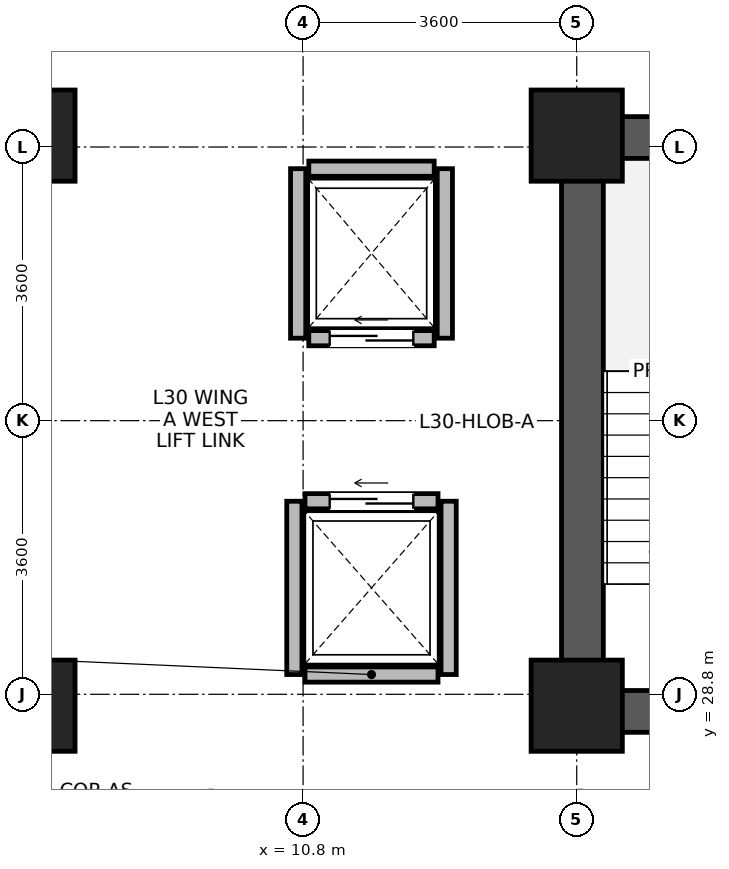
"""IFC4 building model, lengths in metres.
Left out: names, types, materials, properties, quantities, classifications, styles, units other than length and angle.
Written with IfcOpenShell. Run it as: python <this file> out.ifc"""

import sys

from ifc_helpers import new_model, si_unit, direction, frame, frame_2d, origin, origin_2d, place, context, subcontext, project, spatial, rectangle, extrude, source, transform, mapped, element, fill, save


model = new_model("IFC4")
c1 = context("Model", 3, precision=1e-05, world=origin(), true_north=direction((0.0, 1.0)))
c2 = subcontext(c1, "Body", "Model", "MODEL_VIEW")
j1 = project(units=[si_unit("LENGTHUNIT", "METRE"), si_unit("PLANEANGLEUNIT", "RADIAN")], contexts=[c1])
p1 = place(None, origin())
s1 = spatial("IfcSite", under=j1, at=p1, CompositionType="ELEMENT")
p2 = place(p1, origin())
s2 = spatial("IfcBuilding", under=s1, at=p2, CompositionType="ELEMENT")
p3 = place(p2, frame((0.0, 0.0, 119.3)))
s3 = spatial("IfcBuildingStorey", under=s2, at=p3, CompositionType="ELEMENT", Elevation=119.3)
p4 = place(p3, frame((14.475, 28.3, 0.0), z_axis=(0.0, 0.0, 1.0), x_axis=(0.0, 1.0, 0.0)))
e1 = element("IfcWall", 1, at=p4, inside=s3, PredefinedType="SHEAR", context=c2, shape_type="SweptSolid", body=[
    extrude(rectangle(XDim=8.1, YDim=0.55, at=frame_2d((4.05, 0.0))), origin(), (0.0, 0.0, 1.0), 3.45),
])
for number, where, z_axis, x_axis in (
    (2, (14.75, 28.575, 0.0), (0.0, 0.0, 1.0), (1.0, 0.0, 0.0)),
    (3, (14.75, 36.125, 0.0), (0.0, 0.0, 1.0), (1.0, 0.0, 0.0)),
):
    element("IfcWall", number, at=place(p3, frame(where, z_axis=z_axis, x_axis=x_axis)), inside=s3, PredefinedType="SHEAR", context=c2, shape_type="SweptSolid", body=[
        extrude(rectangle(XDim=3.2, YDim=0.55, at=frame_2d((1.6, 0.0))), origin(), (0.0, 0.0, 1.0), 3.45),
    ])
m1 = source(origin(), c2, "Body", "SweptSolid", [
    extrude(rectangle(XDim=1.2, YDim=1.2, at=origin_2d()), origin(), (0.0, 0.0, 1.0), 3.7),
])
for number, where, z_axis, x_axis in (
    (4, (7.2, 28.65, 0.0), (0.0, 0.0, 1.0), (1.0, 0.0, 0.0)),
    (5, (7.2, 36.15, 0.0), (0.0, 0.0, 1.0), (1.0, 0.0, 0.0)),
    (6, (14.4, 28.65, 0.0), (0.0, 0.0, 1.0), (1.0, 0.0, 0.0)),
    (7, (14.4, 36.15, 0.0), (0.0, 0.0, 1.0), (1.0, 0.0, 0.0)),
):
    element("IfcColumn", number, at=place(p3, frame(where, z_axis=z_axis, x_axis=x_axis)), inside=s3, PredefinedType="COLUMN", context=c2, shape_type="MappedRepresentation", body=[
        mapped(m1, transform((0.0, 0.0, 0.0), x_axis=(1.0, 0.0, 0.0), y_axis=(0.0, 1.0, 0.0), z_axis=(0.0, 0.0, 1.0), scale=1.0)),
    ])
p5 = place(p3, frame((10.825, 29.06, 0.0), z_axis=(0.0, 0.0, 1.0), x_axis=(1.0, 0.0, 0.0)))
e8 = element("IfcWall", 8, at=p5, inside=s3, PredefinedType="PARTITIONING", context=c2, shape_type="SweptSolid", body=[
    extrude(rectangle(XDim=1.75, YDim=0.2, at=frame_2d((0.875, 0.0))), origin(), (0.0, 0.0, 1.0), 3.43),
])
p6 = place(p3, frame((10.825, 31.34, 0.0), z_axis=(0.0, 0.0, 1.0), x_axis=(1.0, 0.0, 0.0)))
e9 = element("IfcWall", 9, at=p6, inside=s3, PredefinedType="PARTITIONING", context=c2, shape_type="SweptSolid", body=[
    extrude(rectangle(XDim=1.75, YDim=0.2, at=frame_2d((0.875, 0.0))), origin(), (0.0, 0.0, 1.0), 3.43),
])
p7 = place(p6, frame((0.325, 0.0, 0.0)))
e10 = element("IfcOpeningElement", 10, at=p7, cuts=e9, PredefinedType="OPENING", context=c2, shape_type="SweptSolid", body=[
    extrude(rectangle(XDim=1.1, YDim=2.12, at=frame_2d((0.55, 1.06))), frame((0.0, 0.11, 0.0), z_axis=(0.0, -1.0, 0.0), x_axis=(1.0, 0.0, 0.0)), (0.0, 0.0, 1.0), 0.22),
])
for number, where, z_axis, x_axis in (
    (11, (10.685, 29.06, 0.0), (0.0, 0.0, 1.0), (0.0, 1.0, 0.0)),
    (12, (12.715, 29.06, 0.0), (0.0, 0.0, 1.0), (0.0, 1.0, 0.0)),
):
    element("IfcWall", number, at=place(p3, frame(where, z_axis=z_axis, x_axis=x_axis)), inside=s3, PredefinedType="PARTITIONING", context=c2, shape_type="SweptSolid", body=[
        extrude(rectangle(XDim=2.28, YDim=0.2, at=frame_2d((1.14, 0.0))), origin(), (0.0, 0.0, 1.0), 3.43),
    ])
p8 = place(p3, frame((10.875, 33.485, 0.0), z_axis=(0.0, 0.0, 1.0), x_axis=(1.0, 0.0, 0.0)))
e13 = element("IfcWall", 13, at=p8, inside=s3, PredefinedType="PARTITIONING", context=c2, shape_type="SweptSolid", body=[
    extrude(rectangle(XDim=1.65, YDim=0.2, at=frame_2d((0.825, 0.0))), origin(), (0.0, 0.0, 1.0), 3.43),
])
p9 = place(p8, frame((0.275, 0.0, 0.0)))
e14 = element("IfcOpeningElement", 14, at=p9, cuts=e13, PredefinedType="OPENING", context=c2, shape_type="SweptSolid", body=[
    extrude(rectangle(XDim=1.1, YDim=2.12, at=frame_2d((0.55, 1.06))), frame((0.0, 0.11, 0.0), z_axis=(0.0, -1.0, 0.0), x_axis=(1.0, 0.0, 0.0)), (0.0, 0.0, 1.0), 0.22),
])
p10 = place(p3, frame((10.875, 35.715, 0.0), z_axis=(0.0, 0.0, 1.0), x_axis=(1.0, 0.0, 0.0)))
e15 = element("IfcWall", 15, at=p10, inside=s3, PredefinedType="PARTITIONING", context=c2, shape_type="SweptSolid", body=[
    extrude(rectangle(XDim=1.65, YDim=0.2, at=frame_2d((0.825, 0.0))), origin(), (0.0, 0.0, 1.0), 3.43),
])
for number, where, z_axis, x_axis in (
    (16, (10.735, 33.485, 0.0), (0.0, 0.0, 1.0), (0.0, 1.0, 0.0)),
    (17, (12.665, 33.485, 0.0), (0.0, 0.0, 1.0), (0.0, 1.0, 0.0)),
):
    element("IfcWall", number, at=place(p3, frame(where, z_axis=z_axis, x_axis=x_axis)), inside=s3, PredefinedType="PARTITIONING", context=c2, shape_type="SweptSolid", body=[
        extrude(rectangle(XDim=2.23, YDim=0.2, at=frame_2d((1.115, 0.0))), origin(), (0.0, 0.0, 1.0), 3.43),
    ])
p11 = place(p7, origin())
e18 = element("IfcDoor", 18, at=p11, inside=s3, OperationType="SLIDING_TO_LEFT", PredefinedType="DOOR", context=c2, shape_type="SweptSolid", body=[
    extrude(rectangle(XDim=1.1, YDim=2.12, at=frame_2d((0.55, 1.06))), frame((0.0, 0.025, 0.0), z_axis=(0.0, -1.0, 0.0), x_axis=(1.0, 0.0, 0.0)), (0.0, 0.0, 1.0), 0.05),
])
fill(e10, e18)
p12 = place(p9, origin())
e19 = element("IfcDoor", 19, at=p12, inside=s3, OperationType="SLIDING_TO_LEFT", PredefinedType="DOOR", context=c2, shape_type="SweptSolid", body=[
    extrude(rectangle(XDim=1.1, YDim=2.12, at=frame_2d((0.55, 1.06))), frame((0.0, 0.025, 0.0), z_axis=(0.0, -1.0, 0.0), x_axis=(1.0, 0.0, 0.0)), (0.0, 0.0, 1.0), 0.05),
])
fill(e14, e19)
save(model, sys.argv[1])
